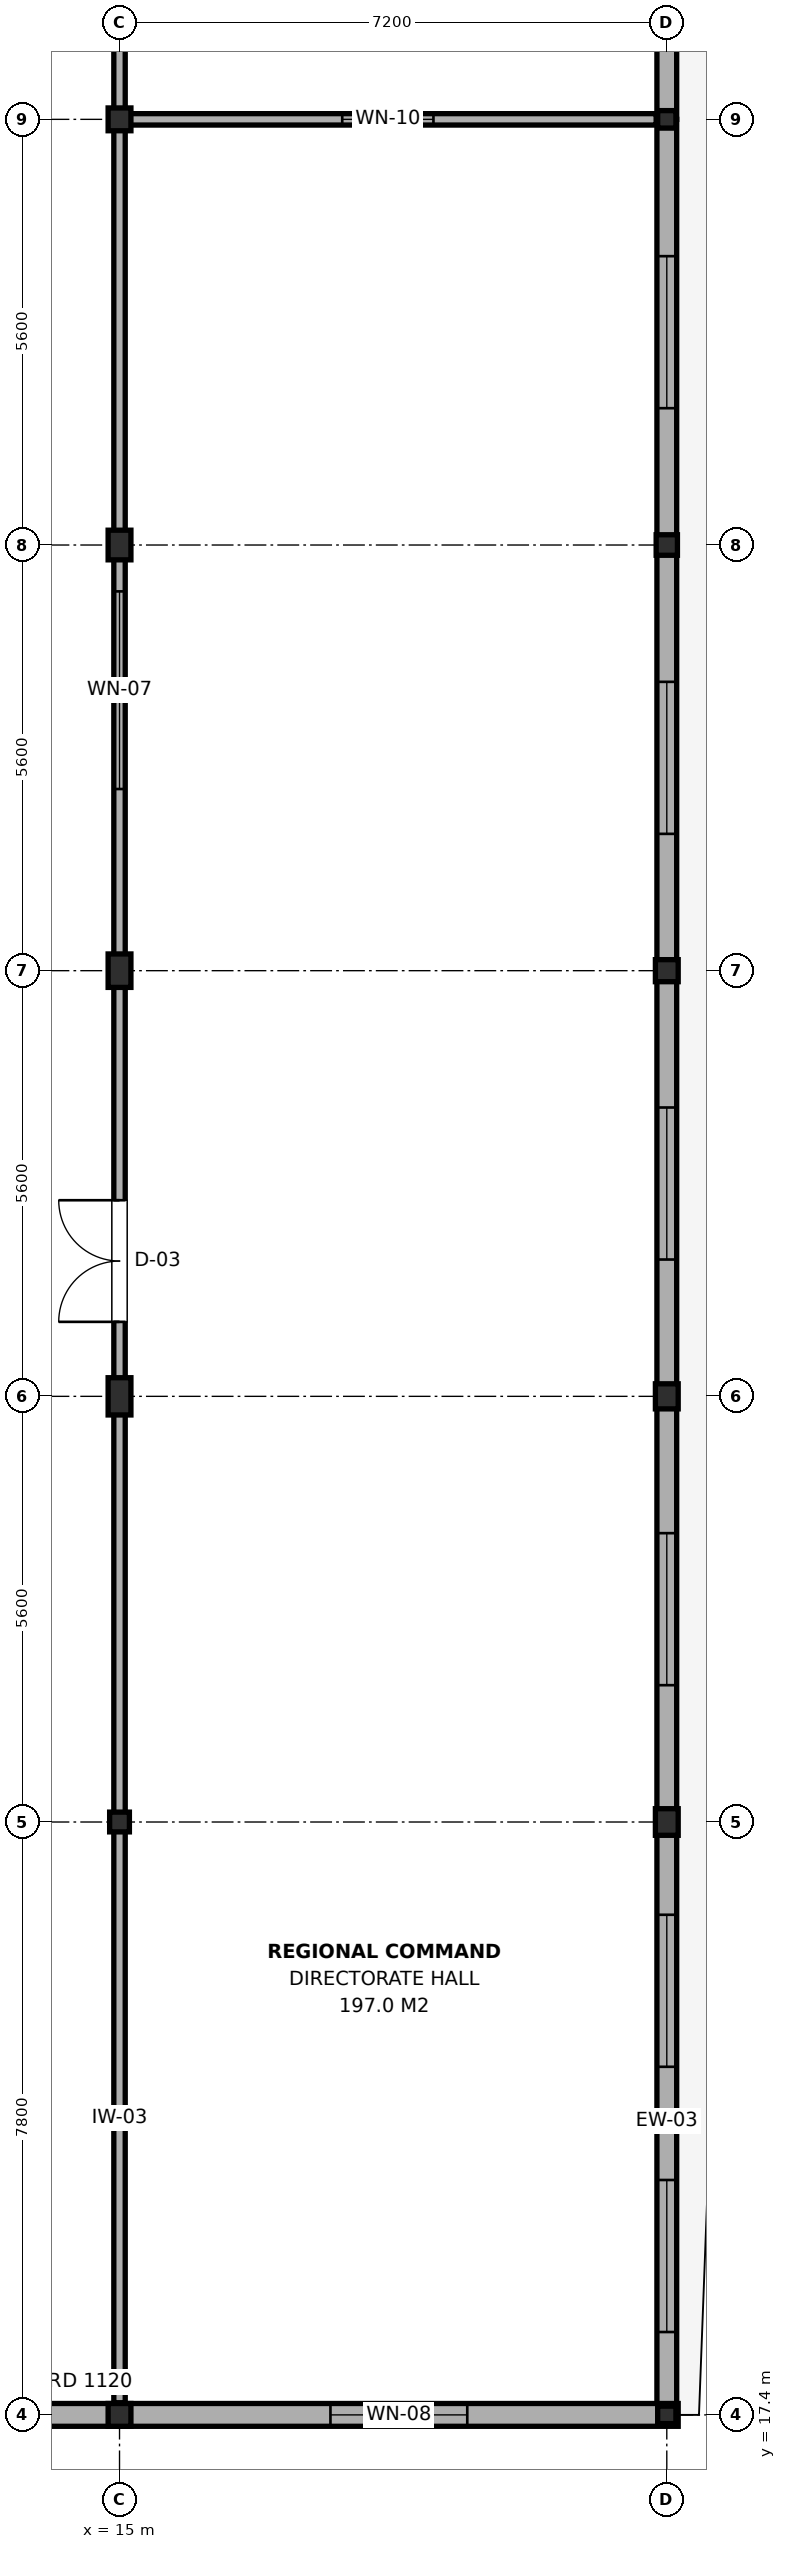
"""IFC4 building model, lengths in metres.
Left out: names, types, materials, properties, quantities, classifications, styles, units other than length and angle.
Written with IfcOpenShell. Run it as: python <this file> out.ifc"""

import sys

from ifc_helpers import new_model, si_unit, direction, frame, frame_2d, origin, origin_2d, place, context, subcontext, project, spatial, rectangle, i_section, extrude, element, fill, save


model = new_model("IFC4")
c1 = context("Model", 3, precision=1e-05, world=origin(), true_north=direction((0.0, 1.0)))
c2 = subcontext(c1, "Body", "Model", "MODEL_VIEW")
j1 = project(units=[si_unit("LENGTHUNIT", "METRE"), si_unit("PLANEANGLEUNIT", "RADIAN")], contexts=[c1])
p1 = place(None, origin())
s1 = spatial("IfcSite", under=j1, at=p1, CompositionType="ELEMENT")
p2 = place(p1, origin())
s2 = spatial("IfcBuilding", under=s1, at=p2, CompositionType="ELEMENT")
p3 = place(p2, frame((0.0, 0.0, 28.8)))
s3 = spatial("IfcBuildingStorey", under=s2, at=p3, CompositionType="ELEMENT", Elevation=28.8)
p4 = place(p3, frame((15.0, 17.4, 0.0), z_axis=(0.0, 0.0, 1.0), x_axis=(1.0, 0.0, 0.0)))
e1 = element("IfcColumn", 1, at=p4, inside=s3, PredefinedType="COLUMN", context=c2, shape_type="SweptSolid", body=[
    extrude(i_section(OverallWidth=0.3, OverallDepth=0.3, WebThickness=0.011, FlangeThickness=0.019, FilletRadius=0.027, at=origin_2d()), origin(), (0.0, 0.0, 1.0), 3.9),
])
p5 = place(p3, frame((15.0, 25.2, 0.0), z_axis=(0.0, 0.0, 1.0), x_axis=(1.0, 0.0, 0.0)))
e2 = element("IfcColumn", 2, at=p5, inside=s3, PredefinedType="COLUMN", context=c2, shape_type="SweptSolid", body=[
    extrude(i_section(OverallWidth=0.26, OverallDepth=0.26, WebThickness=0.01, FlangeThickness=0.018, FilletRadius=0.024, at=origin_2d()), origin(), (0.0, 0.0, 1.0), 3.9),
])
p6 = place(p3, frame((15.0, 30.8, 0.0), z_axis=(0.0, 0.0, 1.0), x_axis=(1.0, 0.0, 0.0)))
e3 = element("IfcColumn", 3, at=p6, inside=s3, PredefinedType="COLUMN", context=c2, shape_type="SweptSolid", body=[
    extrude(i_section(OverallWidth=0.3, OverallDepth=0.49, WebThickness=0.012, FlangeThickness=0.023, FilletRadius=0.027, at=origin_2d()), origin(), (0.0, 0.0, 1.0), 3.9),
])
p7 = place(p3, frame((15.0, 36.4, 0.0), z_axis=(0.0, 0.0, 1.0), x_axis=(1.0, 0.0, 0.0)))
e4 = element("IfcColumn", 4, at=p7, inside=s3, PredefinedType="COLUMN", context=c2, shape_type="SweptSolid", body=[
    extrude(i_section(OverallWidth=0.3, OverallDepth=0.44, WebThickness=0.011, FlangeThickness=0.021, FilletRadius=0.027, at=origin_2d()), origin(), (0.0, 0.0, 1.0), 3.9),
])
p8 = place(p3, frame((15.0, 42.0, 0.0), z_axis=(0.0, 0.0, 1.0), x_axis=(1.0, 0.0, 0.0)))
e5 = element("IfcColumn", 5, at=p8, inside=s3, PredefinedType="COLUMN", context=c2, shape_type="SweptSolid", body=[
    extrude(i_section(OverallWidth=0.3, OverallDepth=0.39, WebThickness=0.011, FlangeThickness=0.019, FilletRadius=0.027, at=origin_2d()), origin(), (0.0, 0.0, 1.0), 3.9),
])
p9 = place(p3, frame((15.0, 47.6, 0.0), z_axis=(0.0, 0.0, 1.0), x_axis=(1.0, 0.0, 0.0)))
e6 = element("IfcColumn", 6, at=p9, inside=s3, PredefinedType="COLUMN", context=c2, shape_type="SweptSolid", body=[
    extrude(i_section(OverallWidth=0.3, OverallDepth=0.3, WebThickness=0.011, FlangeThickness=0.019, FilletRadius=0.027, at=origin_2d()), origin(), (0.0, 0.0, 1.0), 3.9),
])
p10 = place(p3, frame((22.2, 17.4, 0.0), z_axis=(0.0, 0.0, 1.0), x_axis=(1.0, 0.0, 0.0)))
e7 = element("IfcColumn", 7, at=p10, inside=s3, PredefinedType="COLUMN", context=c2, shape_type="SweptSolid", body=[
    extrude(i_section(OverallWidth=0.24, OverallDepth=0.23, WebThickness=0.008, FlangeThickness=0.012, FilletRadius=0.021, at=origin_2d()), origin(), (0.0, 0.0, 1.0), 3.72),
])
p11 = place(p3, frame((22.2, 25.2, 0.0), z_axis=(0.0, 0.0, 1.0), x_axis=(1.0, 0.0, 0.0)))
e8 = element("IfcColumn", 8, at=p11, inside=s3, PredefinedType="COLUMN", context=c2, shape_type="SweptSolid", body=[
    extrude(i_section(OverallWidth=0.3, OverallDepth=0.35, WebThickness=0.01, FlangeThickness=0.018, FilletRadius=0.027, at=origin_2d()), origin(), (0.0, 0.0, 1.0), 3.72),
])
p12 = place(p3, frame((22.2, 30.8, 0.0), z_axis=(0.0, 0.0, 1.0), x_axis=(1.0, 0.0, 0.0)))
e9 = element("IfcColumn", 9, at=p12, inside=s3, PredefinedType="COLUMN", context=c2, shape_type="SweptSolid", body=[
    extrude(i_section(OverallWidth=0.3, OverallDepth=0.33, WebThickness=0.01, FlangeThickness=0.017, FilletRadius=0.027, at=origin_2d()), origin(), (0.0, 0.0, 1.0), 3.72),
])
p13 = place(p3, frame((22.2, 36.4, 0.0), z_axis=(0.0, 0.0, 1.0), x_axis=(1.0, 0.0, 0.0)))
e10 = element("IfcColumn", 10, at=p13, inside=s3, PredefinedType="COLUMN", context=c2, shape_type="SweptSolid", body=[
    extrude(i_section(OverallWidth=0.3, OverallDepth=0.29, WebThickness=0.009, FlangeThickness=0.014, FilletRadius=0.027, at=origin_2d()), origin(), (0.0, 0.0, 1.0), 3.72),
])
p14 = place(p3, frame((22.2, 42.0, 0.0), z_axis=(0.0, 0.0, 1.0), x_axis=(1.0, 0.0, 0.0)))
e11 = element("IfcColumn", 11, at=p14, inside=s3, PredefinedType="COLUMN", context=c2, shape_type="SweptSolid", body=[
    extrude(i_section(OverallWidth=0.28, OverallDepth=0.27, WebThickness=0.008, FlangeThickness=0.013, FilletRadius=0.024, at=origin_2d()), origin(), (0.0, 0.0, 1.0), 3.72),
])
p15 = place(p3, frame((22.2, 47.6, 0.0), z_axis=(0.0, 0.0, 1.0), x_axis=(1.0, 0.0, 0.0)))
e12 = element("IfcColumn", 12, at=p15, inside=s3, PredefinedType="COLUMN", context=c2, shape_type="SweptSolid", body=[
    extrude(i_section(OverallWidth=0.24, OverallDepth=0.23, WebThickness=0.008, FlangeThickness=0.012, FilletRadius=0.021, at=origin_2d()), origin(), (0.0, 0.0, 1.0), 3.72),
])
p16 = place(p3, frame((22.2, 17.27, 0.0), z_axis=(0.0, 0.0, 1.0), x_axis=(0.0, 1.0, 0.0)))
e13 = element("IfcWall", 13, at=p16, inside=s3, PredefinedType="SOLIDWALL", context=c2, shape_type="SweptSolid", body=[
    extrude(rectangle(XDim=7.93, YDim=0.26, at=frame_2d((3.965, 0.0))), origin(), (0.0, 0.0, 1.0), 3.115),
])
p17 = place(p16, frame((1.22, 0.0, 0.9)))
e14 = element("IfcOpeningElement", 14, at=p17, cuts=e13, PredefinedType="OPENING", context=c2, shape_type="SweptSolid", body=[
    extrude(rectangle(XDim=2.0, YDim=1.8, at=frame_2d((1.0, 0.9))), frame((0.0, 0.145, 0.0), z_axis=(0.0, -1.0, 0.0), x_axis=(1.0, 0.0, 0.0)), (0.0, 0.0, 1.0), 0.29),
])
p18 = place(p16, frame((4.71, 0.0, 0.9)))
e15 = element("IfcOpeningElement", 15, at=p18, cuts=e13, PredefinedType="OPENING", context=c2, shape_type="SweptSolid", body=[
    extrude(rectangle(XDim=2.0, YDim=1.8, at=frame_2d((1.0, 0.9))), frame((0.0, 0.145, 0.0), z_axis=(0.0, -1.0, 0.0), x_axis=(1.0, 0.0, 0.0)), (0.0, 0.0, 1.0), 0.29),
])
p19 = place(p3, frame((22.2, 25.2, 0.0), z_axis=(0.0, 0.0, 1.0), x_axis=(0.0, 1.0, 0.0)))
e16 = element("IfcWall", 16, at=p19, inside=s3, PredefinedType="SOLIDWALL", context=c2, shape_type="SweptSolid", body=[
    extrude(rectangle(XDim=5.6, YDim=0.26, at=frame_2d((2.8, 0.0))), origin(), (0.0, 0.0, 1.0), 3.115),
])
p20 = place(p19, frame((1.8, 0.0, 0.9)))
e17 = element("IfcOpeningElement", 17, at=p20, cuts=e16, PredefinedType="OPENING", context=c2, shape_type="SweptSolid", body=[
    extrude(rectangle(XDim=2.0, YDim=1.8, at=frame_2d((1.0, 0.9))), frame((0.0, 0.145, 0.0), z_axis=(0.0, -1.0, 0.0), x_axis=(1.0, 0.0, 0.0)), (0.0, 0.0, 1.0), 0.29),
])
p21 = place(p3, frame((22.2, 30.8, 0.0), z_axis=(0.0, 0.0, 1.0), x_axis=(0.0, 1.0, 0.0)))
e18 = element("IfcWall", 18, at=p21, inside=s3, PredefinedType="SOLIDWALL", context=c2, shape_type="SweptSolid", body=[
    extrude(rectangle(XDim=5.6, YDim=0.26, at=frame_2d((2.8, 0.0))), origin(), (0.0, 0.0, 1.0), 3.165),
])
p22 = place(p21, frame((1.8, 0.0, 0.9)))
e19 = element("IfcOpeningElement", 19, at=p22, cuts=e18, PredefinedType="OPENING", context=c2, shape_type="SweptSolid", body=[
    extrude(rectangle(XDim=2.0, YDim=1.8, at=frame_2d((1.0, 0.9))), frame((0.0, 0.145, 0.0), z_axis=(0.0, -1.0, 0.0), x_axis=(1.0, 0.0, 0.0)), (0.0, 0.0, 1.0), 0.29),
])
p23 = place(p3, frame((22.2, 36.4, 0.0), z_axis=(0.0, 0.0, 1.0), x_axis=(0.0, 1.0, 0.0)))
e20 = element("IfcWall", 20, at=p23, inside=s3, PredefinedType="SOLIDWALL", context=c2, shape_type="SweptSolid", body=[
    extrude(rectangle(XDim=5.6, YDim=0.26, at=frame_2d((2.8, 0.0))), origin(), (0.0, 0.0, 1.0), 3.215),
])
p24 = place(p23, frame((1.8, 0.0, 0.9)))
e21 = element("IfcOpeningElement", 21, at=p24, cuts=e20, PredefinedType="OPENING", context=c2, shape_type="SweptSolid", body=[
    extrude(rectangle(XDim=2.0, YDim=1.8, at=frame_2d((1.0, 0.9))), frame((0.0, 0.145, 0.0), z_axis=(0.0, -1.0, 0.0), x_axis=(1.0, 0.0, 0.0)), (0.0, 0.0, 1.0), 0.29),
])
p25 = place(p3, frame((22.2, 42.0, 0.0), z_axis=(0.0, 0.0, 1.0), x_axis=(0.0, 1.0, 0.0)))
e22 = element("IfcWall", 22, at=p25, inside=s3, PredefinedType="SOLIDWALL", context=c2, shape_type="SweptSolid", body=[
    extrude(rectangle(XDim=5.6, YDim=0.26, at=frame_2d((2.8, 0.0))), origin(), (0.0, 0.0, 1.0), 3.265),
])
p26 = place(p25, frame((1.8, 0.0, 0.9)))
e23 = element("IfcOpeningElement", 23, at=p26, cuts=e22, PredefinedType="OPENING", context=c2, shape_type="SweptSolid", body=[
    extrude(rectangle(XDim=2.0, YDim=1.8, at=frame_2d((1.0, 0.9))), frame((0.0, 0.145, 0.0), z_axis=(0.0, -1.0, 0.0), x_axis=(1.0, 0.0, 0.0)), (0.0, 0.0, 1.0), 0.29),
])
p27 = place(p3, frame((22.2, 47.6, 0.0), z_axis=(0.0, 0.0, 1.0), x_axis=(0.0, 1.0, 0.0)))
e24 = element("IfcWall", 24, at=p27, inside=s3, PredefinedType="SOLIDWALL", context=c2, shape_type="SweptSolid", body=[
    extrude(rectangle(XDim=5.6, YDim=0.26, at=frame_2d((2.8, 0.0))), origin(), (0.0, 0.0, 1.0), 3.115),
])
p28 = place(p27, frame((1.8, 0.0, 0.9)))
e25 = element("IfcOpeningElement", 25, at=p28, cuts=e24, PredefinedType="OPENING", context=c2, shape_type="SweptSolid", body=[
    extrude(rectangle(XDim=2.0, YDim=1.8, at=frame_2d((1.0, 0.9))), frame((0.0, 0.145, 0.0), z_axis=(0.0, -1.0, 0.0), x_axis=(1.0, 0.0, 0.0)), (0.0, 0.0, 1.0), 0.29),
])
p29 = place(p3, frame((7.8, 17.4, 0.0), z_axis=(0.0, 0.0, 1.0), x_axis=(1.0, 0.0, 0.0)))
e26 = element("IfcWall", 26, at=p29, inside=s3, PredefinedType="SOLIDWALL", context=c2, shape_type="SweptSolid", body=[
    extrude(rectangle(XDim=7.2, YDim=0.3, at=frame_2d((3.6, 0.0))), origin(), (0.0, 0.0, 1.0), 3.115),
])
p30 = place(p29, frame((2.7, 0.0, 0.65)))
e27 = element("IfcOpeningElement", 27, at=p30, cuts=e26, PredefinedType="OPENING", context=c2, shape_type="SweptSolid", body=[
    extrude(rectangle(XDim=1.8, YDim=1.2, at=frame_2d((0.9, 0.6))), frame((0.0, 0.165, 0.0), z_axis=(0.0, -1.0, 0.0), x_axis=(1.0, 0.0, 0.0)), (0.0, 0.0, 1.0), 0.33),
])
p31 = place(p3, frame((15.0, 17.4, 0.0), z_axis=(0.0, 0.0, 1.0), x_axis=(1.0, 0.0, 0.0)))
e28 = element("IfcWall", 28, at=p31, inside=s3, PredefinedType="SOLIDWALL", context=c2, shape_type="SweptSolid", body=[
    extrude(rectangle(XDim=7.35, YDim=0.3, at=frame_2d((3.675, 0.0))), origin(), (0.0, 0.0, 1.0), 3.115),
])
p32 = place(p31, frame((2.775, 0.0, 0.65)))
e29 = element("IfcOpeningElement", 29, at=p32, cuts=e28, PredefinedType="OPENING", context=c2, shape_type="SweptSolid", body=[
    extrude(rectangle(XDim=1.8, YDim=1.2, at=frame_2d((0.9, 0.6))), frame((0.0, 0.165, 0.0), z_axis=(0.0, -1.0, 0.0), x_axis=(1.0, 0.0, 0.0)), (0.0, 0.0, 1.0), 0.33),
])
p33 = place(p3, frame((15.0, 17.56, 0.0), z_axis=(0.0, 0.0, 1.0), x_axis=(0.0, 1.0, 0.0)))
e30 = element("IfcWall", 30, at=p33, inside=s3, PredefinedType="PARTITIONING", context=c2, shape_type="SweptSolid", body=[
    extrude(rectangle(XDim=30.04, YDim=0.15, at=frame_2d((15.02, 0.0))), origin(), (0.0, 0.0, 1.0), 3.115),
])
p34 = place(p33, frame((14.22, 0.0, 0.0)))
e31 = element("IfcOpeningElement", 31, at=p34, cuts=e30, PredefinedType="OPENING", context=c2, shape_type="SweptSolid", body=[
    extrude(rectangle(XDim=1.6, YDim=2.15, at=frame_2d((0.8, 1.075))), frame((0.0, 0.09, 0.0), z_axis=(0.0, -1.0, 0.0), x_axis=(1.0, 0.0, 0.0)), (0.0, 0.0, 1.0), 0.18),
])
p35 = place(p33, frame((21.23, 0.0, 0.95)))
e32 = element("IfcOpeningElement", 32, at=p35, cuts=e30, PredefinedType="OPENING", context=c2, shape_type="SweptSolid", body=[
    extrude(rectangle(XDim=2.6, YDim=1.5, at=frame_2d((1.3, 0.75))), frame((0.0, 0.09, 0.0), z_axis=(0.0, -1.0, 0.0), x_axis=(1.0, 0.0, 0.0)), (0.0, 0.0, 1.0), 0.18),
])
p36 = place(p3, frame((15.0, 47.6, 0.0), z_axis=(0.0, 0.0, 1.0), x_axis=(0.0, 1.0, 0.0)))
e33 = element("IfcWall", 33, at=p36, inside=s3, PredefinedType="PARTITIONING", context=c2, shape_type="SweptSolid", body=[
    extrude(rectangle(XDim=26.2, YDim=0.15, at=frame_2d((13.1, 0.0))), origin(), (0.0, 0.0, 1.0), 3.115),
])
p37 = place(p36, frame((12.3, 0.0, 0.0)))
e34 = element("IfcOpeningElement", 34, at=p37, cuts=e33, PredefinedType="OPENING", context=c2, shape_type="SweptSolid", body=[
    extrude(rectangle(XDim=1.6, YDim=2.15, at=frame_2d((0.8, 1.075))), frame((0.0, 0.09, 0.0), z_axis=(0.0, -1.0, 0.0), x_axis=(1.0, 0.0, 0.0)), (0.0, 0.0, 1.0), 0.18),
])
p38 = place(p3, frame((15.0, 47.6, 0.0), z_axis=(0.0, 0.0, 1.0), x_axis=(1.0, 0.0, 0.0)))
e35 = element("IfcWall", 35, at=p38, inside=s3, PredefinedType="PARTITIONING", context=c2, shape_type="SweptSolid", body=[
    extrude(rectangle(XDim=7.06, YDim=0.15, at=frame_2d((3.53, 0.0))), origin(), (0.0, 0.0, 1.0), 3.165),
])
p39 = place(p38, frame((2.93, 0.0, 0.95)))
e36 = element("IfcOpeningElement", 36, at=p39, cuts=e35, PredefinedType="OPENING", context=c2, shape_type="SweptSolid", body=[
    extrude(rectangle(XDim=1.2, YDim=1.5, at=frame_2d((0.6, 0.75))), frame((0.0, 0.09, 0.0), z_axis=(0.0, -1.0, 0.0), x_axis=(1.0, 0.0, 0.0)), (0.0, 0.0, 1.0), 0.18),
])
p40 = place(p17, origin())
e37 = element("IfcWindow", 37, at=p40, inside=s3, PartitioningType="SINGLE_PANEL", PredefinedType="WINDOW", context=c2, shape_type="SweptSolid", body=[
    extrude(rectangle(XDim=2.0, YDim=1.8, at=frame_2d((1.0, 0.9))), frame((0.0, 0.03, 0.0), z_axis=(0.0, -1.0, 0.0), x_axis=(1.0, 0.0, 0.0)), (0.0, 0.0, 1.0), 0.06),
])
fill(e14, e37)
p41 = place(p18, origin())
e38 = element("IfcWindow", 38, at=p41, inside=s3, PartitioningType="SINGLE_PANEL", PredefinedType="WINDOW", context=c2, shape_type="SweptSolid", body=[
    extrude(rectangle(XDim=2.0, YDim=1.8, at=frame_2d((1.0, 0.9))), frame((0.0, 0.03, 0.0), z_axis=(0.0, -1.0, 0.0), x_axis=(1.0, 0.0, 0.0)), (0.0, 0.0, 1.0), 0.06),
])
fill(e15, e38)
p42 = place(p20, origin())
e39 = element("IfcWindow", 39, at=p42, inside=s3, PartitioningType="SINGLE_PANEL", PredefinedType="WINDOW", context=c2, shape_type="SweptSolid", body=[
    extrude(rectangle(XDim=2.0, YDim=1.8, at=frame_2d((1.0, 0.9))), frame((0.0, 0.03, 0.0), z_axis=(0.0, -1.0, 0.0), x_axis=(1.0, 0.0, 0.0)), (0.0, 0.0, 1.0), 0.06),
])
fill(e17, e39)
p43 = place(p22, origin())
e40 = element("IfcWindow", 40, at=p43, inside=s3, PartitioningType="SINGLE_PANEL", PredefinedType="WINDOW", context=c2, shape_type="SweptSolid", body=[
    extrude(rectangle(XDim=2.0, YDim=1.8, at=frame_2d((1.0, 0.9))), frame((0.0, 0.03, 0.0), z_axis=(0.0, -1.0, 0.0), x_axis=(1.0, 0.0, 0.0)), (0.0, 0.0, 1.0), 0.06),
])
fill(e19, e40)
p44 = place(p24, origin())
e41 = element("IfcWindow", 41, at=p44, inside=s3, PartitioningType="SINGLE_PANEL", PredefinedType="WINDOW", context=c2, shape_type="SweptSolid", body=[
    extrude(rectangle(XDim=2.0, YDim=1.8, at=frame_2d((1.0, 0.9))), frame((0.0, 0.03, 0.0), z_axis=(0.0, -1.0, 0.0), x_axis=(1.0, 0.0, 0.0)), (0.0, 0.0, 1.0), 0.06),
])
fill(e21, e41)
p45 = place(p26, origin())
e42 = element("IfcWindow", 42, at=p45, inside=s3, PartitioningType="SINGLE_PANEL", PredefinedType="WINDOW", context=c2, shape_type="SweptSolid", body=[
    extrude(rectangle(XDim=2.0, YDim=1.8, at=frame_2d((1.0, 0.9))), frame((0.0, 0.03, 0.0), z_axis=(0.0, -1.0, 0.0), x_axis=(1.0, 0.0, 0.0)), (0.0, 0.0, 1.0), 0.06),
])
fill(e23, e42)
p46 = place(p32, origin())
e43 = element("IfcWindow", 43, at=p46, inside=s3, PartitioningType="SINGLE_PANEL", PredefinedType="WINDOW", context=c2, shape_type="SweptSolid", body=[
    extrude(rectangle(XDim=1.8, YDim=1.2, at=frame_2d((0.9, 0.6))), frame((0.0, 0.03, 0.0), z_axis=(0.0, -1.0, 0.0), x_axis=(1.0, 0.0, 0.0)), (0.0, 0.0, 1.0), 0.06),
])
fill(e29, e43)
p47 = place(p34, origin())
e44 = element("IfcDoor", 44, at=p47, inside=s3, OperationType="DOUBLE_DOOR_SINGLE_SWING", PredefinedType="DOOR", context=c2, shape_type="SweptSolid", body=[
    extrude(rectangle(XDim=1.6, YDim=2.15, at=frame_2d((0.8, 1.075))), frame((0.0, 0.025, 0.0), z_axis=(0.0, -1.0, 0.0), x_axis=(1.0, 0.0, 0.0)), (0.0, 0.0, 1.0), 0.05),
])
fill(e31, e44)
p48 = place(p35, origin())
e45 = element("IfcWindow", 45, at=p48, inside=s3, PartitioningType="SINGLE_PANEL", PredefinedType="WINDOW", context=c2, shape_type="SweptSolid", body=[
    extrude(rectangle(XDim=2.6, YDim=1.5, at=frame_2d((1.3, 0.75))), frame((0.0, 0.03, 0.0), z_axis=(0.0, -1.0, 0.0), x_axis=(1.0, 0.0, 0.0)), (0.0, 0.0, 1.0), 0.06),
])
fill(e32, e45)
p49 = place(p39, origin())
e46 = element("IfcWindow", 46, at=p49, inside=s3, PartitioningType="SINGLE_PANEL", PredefinedType="WINDOW", context=c2, shape_type="SweptSolid", body=[
    extrude(rectangle(XDim=1.2, YDim=1.5, at=frame_2d((0.6, 0.75))), frame((0.0, 0.03, 0.0), z_axis=(0.0, -1.0, 0.0), x_axis=(1.0, 0.0, 0.0)), (0.0, 0.0, 1.0), 0.06),
])
fill(e36, e46)
save(model, sys.argv[1])
